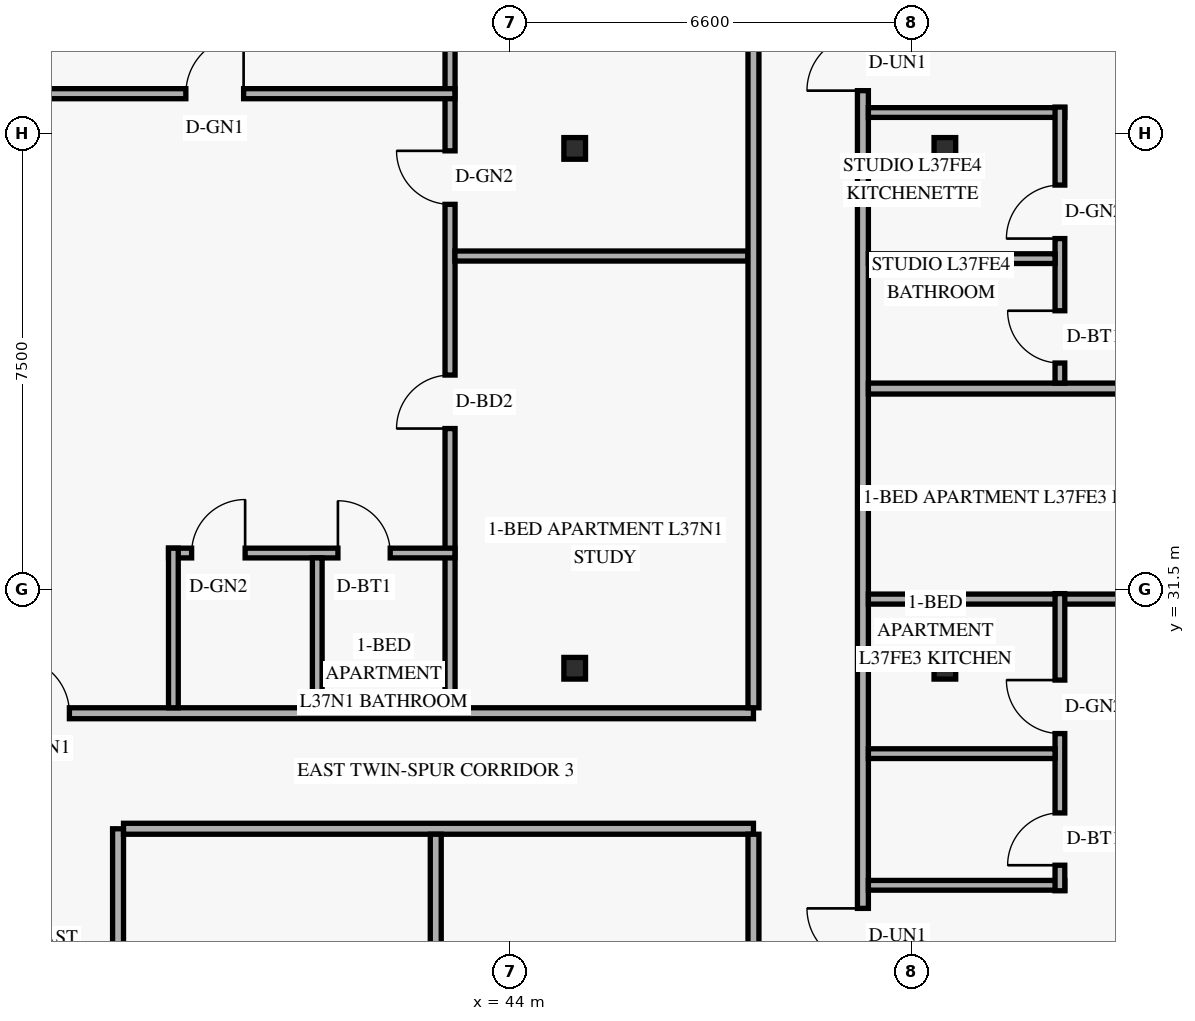
"""IFC4 building model, lengths in metres.
Left out: names, types, materials, properties, quantities, classifications, styles, units other than length and angle.
Written with IfcOpenShell. Run it as: python <this file> out.ifc"""

import sys

from ifc_helpers import new_model, si_unit, direction, frame, frame_2d, origin, origin_2d, place, context, subcontext, project, spatial, rectangle, hollow_rectangle, extrude, element, fill, save


model = new_model("IFC4")
c1 = context("Model", 3, precision=1e-05, world=origin(), true_north=direction((0.0, 1.0)))
c2 = subcontext(c1, "Body", "Model", "MODEL_VIEW")
j1 = project(units=[si_unit("LENGTHUNIT", "METRE"), si_unit("PLANEANGLEUNIT", "RADIAN")], contexts=[c1])
p1 = place(None, origin())
s1 = spatial("IfcSite", under=j1, at=p1, CompositionType="ELEMENT")
p2 = place(p1, origin())
s2 = spatial("IfcBuilding", under=s1, at=p2, CompositionType="ELEMENT")
p3 = place(p2, frame((0.0, 0.0, 144.6)))
s3 = spatial("IfcBuildingStorey", under=s2, at=p3, CompositionType="ELEMENT", Elevation=144.6)
for number, where, z_axis, x_axis in (
    (1, (44.997, 30.2, 0.0), (0.035, 0.0, 0.999), (0.0, 1.0, 0.0)),
    (2, (44.997, 38.75, 0.0), (0.035, 0.0, 0.999), (0.0, 1.0, 0.0)),
):
    element("IfcColumn", number, at=place(p3, frame(where, z_axis=z_axis, x_axis=x_axis)), inside=s3, PredefinedType="COLUMN", context=c2, shape_type="SweptSolid", body=[
        extrude(hollow_rectangle(XDim=0.356, YDim=0.356, WallThickness=0.016, at=origin_2d()), origin(), (0.0, 0.0, 1.0), 3.602),
    ])
for number, where, z_axis, x_axis in (
    (3, (51.044, 30.2, 0.0), (0.058, 0.0, 0.998), (0.0, 1.0, 0.0)),
    (4, (51.044, 38.75, 0.0), (0.058, 0.0, 0.998), (0.0, 1.0, 0.0)),
):
    element("IfcColumn", number, at=place(p3, frame(where, z_axis=z_axis, x_axis=x_axis)), inside=s3, PredefinedType="COLUMN", context=c2, shape_type="SweptSolid", body=[
        extrude(hollow_rectangle(XDim=0.356, YDim=0.356, WallThickness=0.016, at=origin_2d()), origin(), (0.0, 0.0, 1.0), 3.606),
    ])
p4 = place(p3, frame((37.55, 17.28, 0.0), z_axis=(0.0, 0.0, 1.0), x_axis=(0.0, 1.0, 0.0)))
e5 = element("IfcWall", 5, at=p4, inside=s3, PredefinedType="STANDARD", context=c2, shape_type="SweptSolid", body=[
    extrude(rectangle(XDim=10.28, YDim=0.18, at=frame_2d((5.14, 0.0))), origin(), (0.0, 0.0, 1.0), 2.73),
])
p5 = place(p4, frame((5.0, 0.0, 0.0)))
e6 = element("IfcOpeningElement", 6, at=p5, cuts=e5, PredefinedType="OPENING", context=c2, shape_type="SweptSolid", body=[
    extrude(rectangle(XDim=0.92, YDim=2.15, at=frame_2d((0.46, 1.075))), frame((0.0, 0.1, 0.0), z_axis=(0.0, -1.0, 0.0), x_axis=(1.0, 0.0, 0.0)), (0.0, 0.0, 1.0), 0.2),
])
p6 = place(p3, frame((37.64, 27.56, 0.0), z_axis=(0.0, 0.0, 1.0), x_axis=(1.0, 0.0, 0.0)))
e7 = element("IfcWall", 7, at=p6, inside=s3, PredefinedType="STANDARD", context=c2, shape_type="SweptSolid", body=[
    extrude(rectangle(XDim=10.36, YDim=0.18, at=frame_2d((5.18, 0.0))), origin(), (0.0, 0.0, 1.0), 2.73),
])
p7 = place(p3, frame((35.51, 29.46, 0.0), z_axis=(0.0, 0.0, 1.0), x_axis=(1.0, 0.0, 0.0)))
e8 = element("IfcWall", 8, at=p7, inside=s3, PredefinedType="STANDARD", context=c2, shape_type="SweptSolid", body=[
    extrude(rectangle(XDim=12.49, YDim=0.18, at=frame_2d((6.245, 0.0))), origin(), (0.0, 0.0, 1.0), 2.73),
])
p8 = place(p7, frame((0.32, 0.0, 0.0)))
e9 = element("IfcOpeningElement", 9, at=p8, cuts=e8, PredefinedType="OPENING", context=c2, shape_type="SweptSolid", body=[
    extrude(rectangle(XDim=0.92, YDim=2.15, at=frame_2d((0.46, 1.075))), frame((0.0, 0.1, 0.0), z_axis=(0.0, -1.0, 0.0), x_axis=(1.0, 0.0, 0.0)), (0.0, 0.0, 1.0), 0.2),
])
p9 = place(p3, frame((43.01, 29.55, 0.0), z_axis=(0.0, 0.0, 1.0), x_axis=(0.0, 1.0, 0.0)))
e10 = element("IfcWall", 10, at=p9, inside=s3, PredefinedType="PARTITIONING", context=c2, shape_type="SweptSolid", body=[
    extrude(rectangle(XDim=14.17, YDim=0.165, at=frame_2d((7.085, 0.0))), origin(), (0.0, 0.0, 1.0), 2.73),
])
p10 = place(p9, frame((4.593, 0.0, 0.0)))
e11 = element("IfcOpeningElement", 11, at=p10, cuts=e10, PredefinedType="OPENING", context=c2, shape_type="SweptSolid", body=[
    extrude(rectangle(XDim=0.88, YDim=2.14, at=frame_2d((0.44, 1.07))), frame((0.0, 0.093, 0.0), z_axis=(0.0, -1.0, 0.0), x_axis=(1.0, 0.0, 0.0)), (0.0, 0.0, 1.0), 0.185),
])
p11 = place(p9, frame((8.28, 0.0, 0.0)))
e12 = element("IfcOpeningElement", 12, at=p11, cuts=e10, PredefinedType="OPENING", context=c2, shape_type="SweptSolid", body=[
    extrude(rectangle(XDim=0.88, YDim=2.12, at=frame_2d((0.44, 1.06))), frame((0.0, 0.093, 0.0), z_axis=(0.0, -1.0, 0.0), x_axis=(1.0, 0.0, 0.0)), (0.0, 0.0, 1.0), 0.185),
])
p12 = place(p3, frame((38.38, 32.095, 0.0), z_axis=(0.0, 0.0, 1.0), x_axis=(1.0, 0.0, 0.0)))
e13 = element("IfcWall", 13, at=p12, inside=s3, PredefinedType="PLUMBINGWALL", context=c2, shape_type="SweptSolid", body=[
    extrude(rectangle(XDim=4.71, YDim=0.16, at=frame_2d((2.355, 0.0))), origin(), (0.0, 0.0, 1.0), 3.36),
])
p13 = place(p12, frame((0.38, 0.0, 0.0)))
e14 = element("IfcOpeningElement", 14, at=p13, cuts=e13, PredefinedType="OPENING", context=c2, shape_type="SweptSolid", body=[
    extrude(rectangle(XDim=0.88, YDim=2.12, at=frame_2d((0.44, 1.06))), frame((0.0, 0.09, 0.0), z_axis=(0.0, -1.0, 0.0), x_axis=(1.0, 0.0, 0.0)), (0.0, 0.0, 1.0), 0.18),
])
p14 = place(p12, frame((2.786, 0.0, 0.0)))
e15 = element("IfcOpeningElement", 15, at=p14, cuts=e13, PredefinedType="OPENING", context=c2, shape_type="SweptSolid", body=[
    extrude(rectangle(XDim=0.86, YDim=2.12, at=frame_2d((0.43, 1.06))), frame((0.0, 0.09, 0.0), z_axis=(0.0, -1.0, 0.0), x_axis=(1.0, 0.0, 0.0)), (0.0, 0.0, 1.0), 0.18),
])
p15 = place(p3, frame((38.46, 29.55, 0.0), z_axis=(0.0, 0.0, 1.0), x_axis=(0.0, 1.0, 0.0)))
e16 = element("IfcWall", 16, at=p15, inside=s3, PredefinedType="PLUMBINGWALL", context=c2, shape_type="SweptSolid", body=[
    extrude(rectangle(XDim=2.625, YDim=0.16, at=frame_2d((1.312, 0.0))), origin(), (0.0, 0.0, 1.0), 2.73),
])
p16 = place(p3, frame((40.826, 29.55, 0.0), z_axis=(0.0, 0.0, 1.0), x_axis=(0.0, 1.0, 0.0)))
e17 = element("IfcWall", 17, at=p16, inside=s3, PredefinedType="PLUMBINGWALL", context=c2, shape_type="SweptSolid", body=[
    extrude(rectangle(XDim=2.465, YDim=0.16, at=frame_2d((1.232, 0.0))), origin(), (0.0, 0.0, 1.0), 2.73),
])
p17 = place(p3, frame((35.51, 39.65, 0.0), z_axis=(0.0, 0.0, 1.0), x_axis=(1.0, 0.0, 0.0)))
e18 = element("IfcWall", 18, at=p17, inside=s3, PredefinedType="PARTITIONING", context=c2, shape_type="SweptSolid", body=[
    extrude(rectangle(XDim=7.58, YDim=0.165, at=frame_2d((3.79, 0.0))), origin(), (0.0, 0.0, 1.0), 3.36),
])
p18 = place(p17, frame((3.155, 0.0, 0.0)))
e19 = element("IfcOpeningElement", 19, at=p18, cuts=e18, PredefinedType="OPENING", context=c2, shape_type="SweptSolid", body=[
    extrude(rectangle(XDim=0.95, YDim=2.15, at=frame_2d((0.475, 1.075))), frame((0.0, 0.093, 0.0), z_axis=(0.0, -1.0, 0.0), x_axis=(1.0, 0.0, 0.0)), (0.0, 0.0, 1.0), 0.185),
])
p19 = place(p3, frame((43.09, 36.98, 0.0), z_axis=(0.0, 0.0, 1.0), x_axis=(1.0, 0.0, 0.0)))
e20 = element("IfcWall", 20, at=p19, inside=s3, PredefinedType="PARTITIONING", context=c2, shape_type="SweptSolid", body=[
    extrude(rectangle(XDim=4.82, YDim=0.165, at=frame_2d((2.41, 0.0))), origin(), (0.0, 0.0, 1.0), 2.73),
])
p20 = place(p3, frame((42.775, 17.37, 0.0), z_axis=(0.0, 0.0, 1.0), x_axis=(0.0, 1.0, 0.0)))
e21 = element("IfcWall", 21, at=p20, inside=s3, PredefinedType="PARTITIONING", context=c2, shape_type="SweptSolid", body=[
    extrude(rectangle(XDim=10.1, YDim=0.18, at=frame_2d((5.05, 0.0))), origin(), (0.0, 0.0, 1.0), 2.73),
])
p21 = place(p3, frame((49.8, 4.28, 0.0), z_axis=(0.0, 0.0, 1.0), x_axis=(0.0, 1.0, 0.0)))
e22 = element("IfcWall", 22, at=p21, inside=s3, PredefinedType="STANDARD", context=c2, shape_type="SweptSolid", body=[
    extrude(rectangle(XDim=39.44, YDim=0.18, at=frame_2d((19.72, 0.0))), origin(), (0.0, 0.0, 1.0), 2.73),
])
p22 = place(p21, frame((3.38, 0.0, 0.0)))
e23 = element("IfcOpeningElement", 23, at=p22, cuts=e22, PredefinedType="OPENING", context=c2, shape_type="SweptSolid", body=[
    extrude(rectangle(XDim=0.92, YDim=2.15, at=frame_2d((0.46, 1.075))), frame((0.0, 0.1, 0.0), z_axis=(0.0, -1.0, 0.0), x_axis=(1.0, 0.0, 0.0)), (0.0, 0.0, 1.0), 0.2),
])
p23 = place(p21, frame((14.32, 0.0, 0.0)))
e24 = element("IfcOpeningElement", 24, at=p23, cuts=e22, PredefinedType="OPENING", context=c2, shape_type="SweptSolid", body=[
    extrude(rectangle(XDim=0.92, YDim=2.15, at=frame_2d((0.46, 1.075))), frame((0.0, 0.1, 0.0), z_axis=(0.0, -1.0, 0.0), x_axis=(1.0, 0.0, 0.0)), (0.0, 0.0, 1.0), 0.2),
])
p24 = place(p21, frame((21.05, 0.0, 0.0)))
e25 = element("IfcOpeningElement", 25, at=p24, cuts=e22, PredefinedType="OPENING", context=c2, shape_type="SweptSolid", body=[
    extrude(rectangle(XDim=0.92, YDim=2.15, at=frame_2d((0.46, 1.075))), frame((0.0, 0.1, 0.0), z_axis=(0.0, -1.0, 0.0), x_axis=(1.0, 0.0, 0.0)), (0.0, 0.0, 1.0), 0.2),
])
p25 = place(p21, frame((35.42, 0.0, 0.0)))
e26 = element("IfcOpeningElement", 26, at=p25, cuts=e22, PredefinedType="OPENING", context=c2, shape_type="SweptSolid", body=[
    extrude(rectangle(XDim=0.92, YDim=2.15, at=frame_2d((0.46, 1.075))), frame((0.0, 0.1, 0.0), z_axis=(0.0, -1.0, 0.0), x_axis=(1.0, 0.0, 0.0)), (0.0, 0.0, 1.0), 0.2),
])
p26 = place(p3, frame((48.0, 17.37, 0.0), z_axis=(0.0, 0.0, 1.0), x_axis=(0.0, 1.0, 0.0)))
e27 = element("IfcWall", 27, at=p26, inside=s3, PredefinedType="STANDARD", context=c2, shape_type="SweptSolid", body=[
    extrude(rectangle(XDim=10.1, YDim=0.18, at=frame_2d((5.05, 0.0))), origin(), (0.0, 0.0, 1.0), 2.73),
])
p27 = place(p3, frame((48.0, 29.55, 0.0), z_axis=(0.0, 0.0, 1.0), x_axis=(0.0, 1.0, 0.0)))
e28 = element("IfcWall", 28, at=p27, inside=s3, PredefinedType="STANDARD", context=c2, shape_type="SweptSolid", body=[
    extrude(rectangle(XDim=14.17, YDim=0.18, at=frame_2d((7.085, 0.0))), origin(), (0.0, 0.0, 1.0), 2.73),
])
p28 = place(p3, frame((49.89, 31.337, 0.0), z_axis=(0.0, 0.0, 1.0), x_axis=(1.0, 0.0, 0.0)))
e29 = element("IfcWall", 29, at=p28, inside=s3, PredefinedType="PARTITIONING", context=c2, shape_type="SweptSolid", body=[
    extrude(rectangle(XDim=8.43, YDim=0.165, at=frame_2d((4.215, 0.0))), origin(), (0.0, 0.0, 1.0), 2.879),
])
p29 = place(p28, frame((5.495, 0.0, 0.0)))
e30 = element("IfcOpeningElement", 30, at=p29, cuts=e29, PredefinedType="OPENING", context=c2, shape_type="SweptSolid", body=[
    extrude(rectangle(XDim=0.9, YDim=2.14, at=frame_2d((0.45, 1.07))), frame((0.0, 0.093, 0.0), z_axis=(0.0, -1.0, 0.0), x_axis=(1.0, 0.0, 0.0)), (0.0, 0.0, 1.0), 0.185),
])
p30 = place(p3, frame((49.89, 26.63, 0.0), z_axis=(0.0, 0.0, 1.0), x_axis=(1.0, 0.0, 0.0)))
e31 = element("IfcWall", 31, at=p30, inside=s3, PredefinedType="PLUMBINGWALL", context=c2, shape_type="SweptSolid", body=[
    extrude(rectangle(XDim=3.23, YDim=0.16, at=frame_2d((1.615, 0.0))), origin(), (0.0, 0.0, 1.0), 2.879),
])
p31 = place(p3, frame((53.04, 26.54, 0.0), z_axis=(0.0, 0.0, 1.0), x_axis=(0.0, 1.0, 0.0)))
e32 = element("IfcWall", 32, at=p31, inside=s3, PredefinedType="PLUMBINGWALL", context=c2, shape_type="SweptSolid", body=[
    extrude(rectangle(XDim=4.887, YDim=0.16, at=frame_2d((2.444, 0.0))), origin(), (0.0, 0.0, 1.0), 3.36),
])
p32 = place(p31, frame((0.42, 0.0, 0.0)))
e33 = element("IfcOpeningElement", 33, at=p32, cuts=e32, PredefinedType="OPENING", context=c2, shape_type="SweptSolid", body=[
    extrude(rectangle(XDim=0.86, YDim=2.12, at=frame_2d((0.43, 1.06))), frame((0.0, 0.09, 0.0), z_axis=(0.0, -1.0, 0.0), x_axis=(1.0, 0.0, 0.0)), (0.0, 0.0, 1.0), 0.18),
])
p33 = place(p31, frame((2.585, 0.0, 0.0)))
e34 = element("IfcOpeningElement", 34, at=p33, cuts=e32, PredefinedType="OPENING", context=c2, shape_type="SweptSolid", body=[
    extrude(rectangle(XDim=0.88, YDim=2.12, at=frame_2d((0.44, 1.06))), frame((0.0, 0.09, 0.0), z_axis=(0.0, -1.0, 0.0), x_axis=(1.0, 0.0, 0.0)), (0.0, 0.0, 1.0), 0.18),
])
p34 = place(p3, frame((49.89, 28.796, 0.0), z_axis=(0.0, 0.0, 1.0), x_axis=(1.0, 0.0, 0.0)))
e35 = element("IfcWall", 35, at=p34, inside=s3, PredefinedType="PLUMBINGWALL", context=c2, shape_type="SweptSolid", body=[
    extrude(rectangle(XDim=3.07, YDim=0.16, at=frame_2d((1.535, 0.0))), origin(), (0.0, 0.0, 1.0), 2.879),
])
p35 = place(p3, frame((49.89, 34.8, 0.0), z_axis=(0.0, 0.0, 1.0), x_axis=(1.0, 0.0, 0.0)))
e36 = element("IfcWall", 36, at=p35, inside=s3, PredefinedType="PARTITIONING", context=c2, shape_type="SweptSolid", body=[
    extrude(rectangle(XDim=8.43, YDim=0.18, at=frame_2d((4.215, 0.0))), origin(), (0.0, 0.0, 1.0), 2.879),
])
p36 = place(p3, frame((49.89, 39.34, 0.0), z_axis=(0.0, 0.0, 1.0), x_axis=(1.0, 0.0, 0.0)))
e37 = element("IfcWall", 37, at=p36, inside=s3, PredefinedType="PLUMBINGWALL", context=c2, shape_type="SweptSolid", body=[
    extrude(rectangle(XDim=3.23, YDim=0.16, at=frame_2d((1.615, 0.0))), origin(), (0.0, 0.0, 1.0), 2.879),
])
p37 = place(p3, frame((53.04, 34.89, 0.0), z_axis=(0.0, 0.0, 1.0), x_axis=(0.0, 1.0, 0.0)))
e38 = element("IfcWall", 38, at=p37, inside=s3, PredefinedType="PLUMBINGWALL", context=c2, shape_type="SweptSolid", body=[
    extrude(rectangle(XDim=4.54, YDim=0.16, at=frame_2d((2.27, 0.0))), origin(), (0.0, 0.0, 1.0), 3.36),
])
p38 = place(p37, frame((0.33, 0.0, 0.0)))
e39 = element("IfcOpeningElement", 39, at=p38, cuts=e38, PredefinedType="OPENING", context=c2, shape_type="SweptSolid", body=[
    extrude(rectangle(XDim=0.86, YDim=2.12, at=frame_2d((0.43, 1.06))), frame((0.0, 0.09, 0.0), z_axis=(0.0, -1.0, 0.0), x_axis=(1.0, 0.0, 0.0)), (0.0, 0.0, 1.0), 0.18),
])
p39 = place(p37, frame((2.377, 0.0, 0.0)))
e40 = element("IfcOpeningElement", 40, at=p39, cuts=e38, PredefinedType="OPENING", context=c2, shape_type="SweptSolid", body=[
    extrude(rectangle(XDim=0.88, YDim=2.12, at=frame_2d((0.44, 1.06))), frame((0.0, 0.09, 0.0), z_axis=(0.0, -1.0, 0.0), x_axis=(1.0, 0.0, 0.0)), (0.0, 0.0, 1.0), 0.18),
])
p40 = place(p3, frame((49.89, 36.937, 0.0), z_axis=(0.0, 0.0, 1.0), x_axis=(1.0, 0.0, 0.0)))
e41 = element("IfcWall", 41, at=p40, inside=s3, PredefinedType="PLUMBINGWALL", context=c2, shape_type="SweptSolid", body=[
    extrude(rectangle(XDim=3.07, YDim=0.16, at=frame_2d((1.535, 0.0))), origin(), (0.0, 0.0, 1.0), 2.879),
])
p41 = place(p18, origin())
e42 = element("IfcDoor", 42, at=p41, inside=s3, OperationType="SINGLE_SWING_RIGHT", PredefinedType="DOOR", context=c2, shape_type="SweptSolid", body=[
    extrude(rectangle(XDim=0.95, YDim=2.15, at=frame_2d((0.475, 1.075))), frame((0.0, 0.025, 0.0), z_axis=(0.0, -1.0, 0.0), x_axis=(1.0, 0.0, 0.0)), (0.0, 0.0, 1.0), 0.05),
])
fill(e19, e42)
p42 = place(p8, origin())
e43 = element("IfcDoor", 43, at=p42, inside=s3, OperationType="SINGLE_SWING_LEFT", PredefinedType="DOOR", context=c2, shape_type="SweptSolid", body=[
    extrude(rectangle(XDim=0.92, YDim=2.15, at=frame_2d((0.46, 1.075))), frame((0.0, 0.025, 0.0), z_axis=(0.0, -1.0, 0.0), x_axis=(1.0, 0.0, 0.0)), (0.0, 0.0, 1.0), 0.05),
])
fill(e9, e43)
p43 = place(p13, origin())
e44 = element("IfcDoor", 44, at=p43, inside=s3, OperationType="SINGLE_SWING_RIGHT", PredefinedType="DOOR", context=c2, shape_type="SweptSolid", body=[
    extrude(rectangle(XDim=0.88, YDim=2.12, at=frame_2d((0.44, 1.06))), frame((0.0, 0.025, 0.0), z_axis=(0.0, -1.0, 0.0), x_axis=(1.0, 0.0, 0.0)), (0.0, 0.0, 1.0), 0.05),
])
fill(e14, e44)
p44 = place(p14, origin())
e45 = element("IfcDoor", 45, at=p44, inside=s3, OperationType="SINGLE_SWING_LEFT", PredefinedType="DOOR", context=c2, shape_type="SweptSolid", body=[
    extrude(rectangle(XDim=0.86, YDim=2.12, at=frame_2d((0.43, 1.06))), frame((0.0, 0.025, 0.0), z_axis=(0.0, -1.0, 0.0), x_axis=(1.0, 0.0, 0.0)), (0.0, 0.0, 1.0), 0.05),
])
fill(e15, e45)
p45 = place(p10, origin())
e46 = element("IfcDoor", 46, at=p45, inside=s3, OperationType="SINGLE_SWING_LEFT", PredefinedType="DOOR", context=c2, shape_type="SweptSolid", body=[
    extrude(rectangle(XDim=0.88, YDim=2.14, at=frame_2d((0.44, 1.07))), frame((0.0, 0.025, 0.0), z_axis=(0.0, -1.0, 0.0), x_axis=(1.0, 0.0, 0.0)), (0.0, 0.0, 1.0), 0.05),
])
fill(e11, e46)
p46 = place(p11, origin())
e47 = element("IfcDoor", 47, at=p46, inside=s3, OperationType="SINGLE_SWING_RIGHT", PredefinedType="DOOR", context=c2, shape_type="SweptSolid", body=[
    extrude(rectangle(XDim=0.88, YDim=2.12, at=frame_2d((0.44, 1.06))), frame((0.0, 0.025, 0.0), z_axis=(0.0, -1.0, 0.0), x_axis=(1.0, 0.0, 0.0)), (0.0, 0.0, 1.0), 0.05),
])
fill(e12, e47)
p47 = place(p24, origin())
e48 = element("IfcDoor", 48, at=p47, inside=s3, OperationType="SINGLE_SWING_RIGHT", PredefinedType="DOOR", context=c2, shape_type="SweptSolid", body=[
    extrude(rectangle(XDim=0.92, YDim=2.15, at=frame_2d((0.46, 1.075))), frame((0.0, 0.025, 0.0), z_axis=(0.0, -1.0, 0.0), x_axis=(1.0, 0.0, 0.0)), (0.0, 0.0, 1.0), 0.05),
])
fill(e25, e48)
p48 = place(p32, origin())
e49 = element("IfcDoor", 49, at=p48, inside=s3, OperationType="SINGLE_SWING_LEFT", PredefinedType="DOOR", context=c2, shape_type="SweptSolid", body=[
    extrude(rectangle(XDim=0.86, YDim=2.12, at=frame_2d((0.43, 1.06))), frame((0.0, 0.025, 0.0), z_axis=(0.0, -1.0, 0.0), x_axis=(1.0, 0.0, 0.0)), (0.0, 0.0, 1.0), 0.05),
])
fill(e33, e49)
p49 = place(p33, origin())
e50 = element("IfcDoor", 50, at=p49, inside=s3, OperationType="SINGLE_SWING_RIGHT", PredefinedType="DOOR", context=c2, shape_type="SweptSolid", body=[
    extrude(rectangle(XDim=0.88, YDim=2.12, at=frame_2d((0.44, 1.06))), frame((0.0, 0.025, 0.0), z_axis=(0.0, -1.0, 0.0), x_axis=(1.0, 0.0, 0.0)), (0.0, 0.0, 1.0), 0.05),
])
fill(e34, e50)
p50 = place(p25, origin())
e51 = element("IfcDoor", 51, at=p50, inside=s3, OperationType="SINGLE_SWING_LEFT", PredefinedType="DOOR", context=c2, shape_type="SweptSolid", body=[
    extrude(rectangle(XDim=0.92, YDim=2.15, at=frame_2d((0.46, 1.075))), frame((0.0, 0.025, 0.0), z_axis=(0.0, -1.0, 0.0), x_axis=(1.0, 0.0, 0.0)), (0.0, 0.0, 1.0), 0.05),
])
fill(e26, e51)
p51 = place(p38, origin())
e52 = element("IfcDoor", 52, at=p51, inside=s3, OperationType="SINGLE_SWING_RIGHT", PredefinedType="DOOR", context=c2, shape_type="SweptSolid", body=[
    extrude(rectangle(XDim=0.86, YDim=2.12, at=frame_2d((0.43, 1.06))), frame((0.0, 0.025, 0.0), z_axis=(0.0, -1.0, 0.0), x_axis=(1.0, 0.0, 0.0)), (0.0, 0.0, 1.0), 0.05),
])
fill(e39, e52)
p52 = place(p39, origin())
e53 = element("IfcDoor", 53, at=p52, inside=s3, OperationType="SINGLE_SWING_LEFT", PredefinedType="DOOR", context=c2, shape_type="SweptSolid", body=[
    extrude(rectangle(XDim=0.88, YDim=2.12, at=frame_2d((0.44, 1.06))), frame((0.0, 0.025, 0.0), z_axis=(0.0, -1.0, 0.0), x_axis=(1.0, 0.0, 0.0)), (0.0, 0.0, 1.0), 0.05),
])
fill(e40, e53)
save(model, sys.argv[1])
